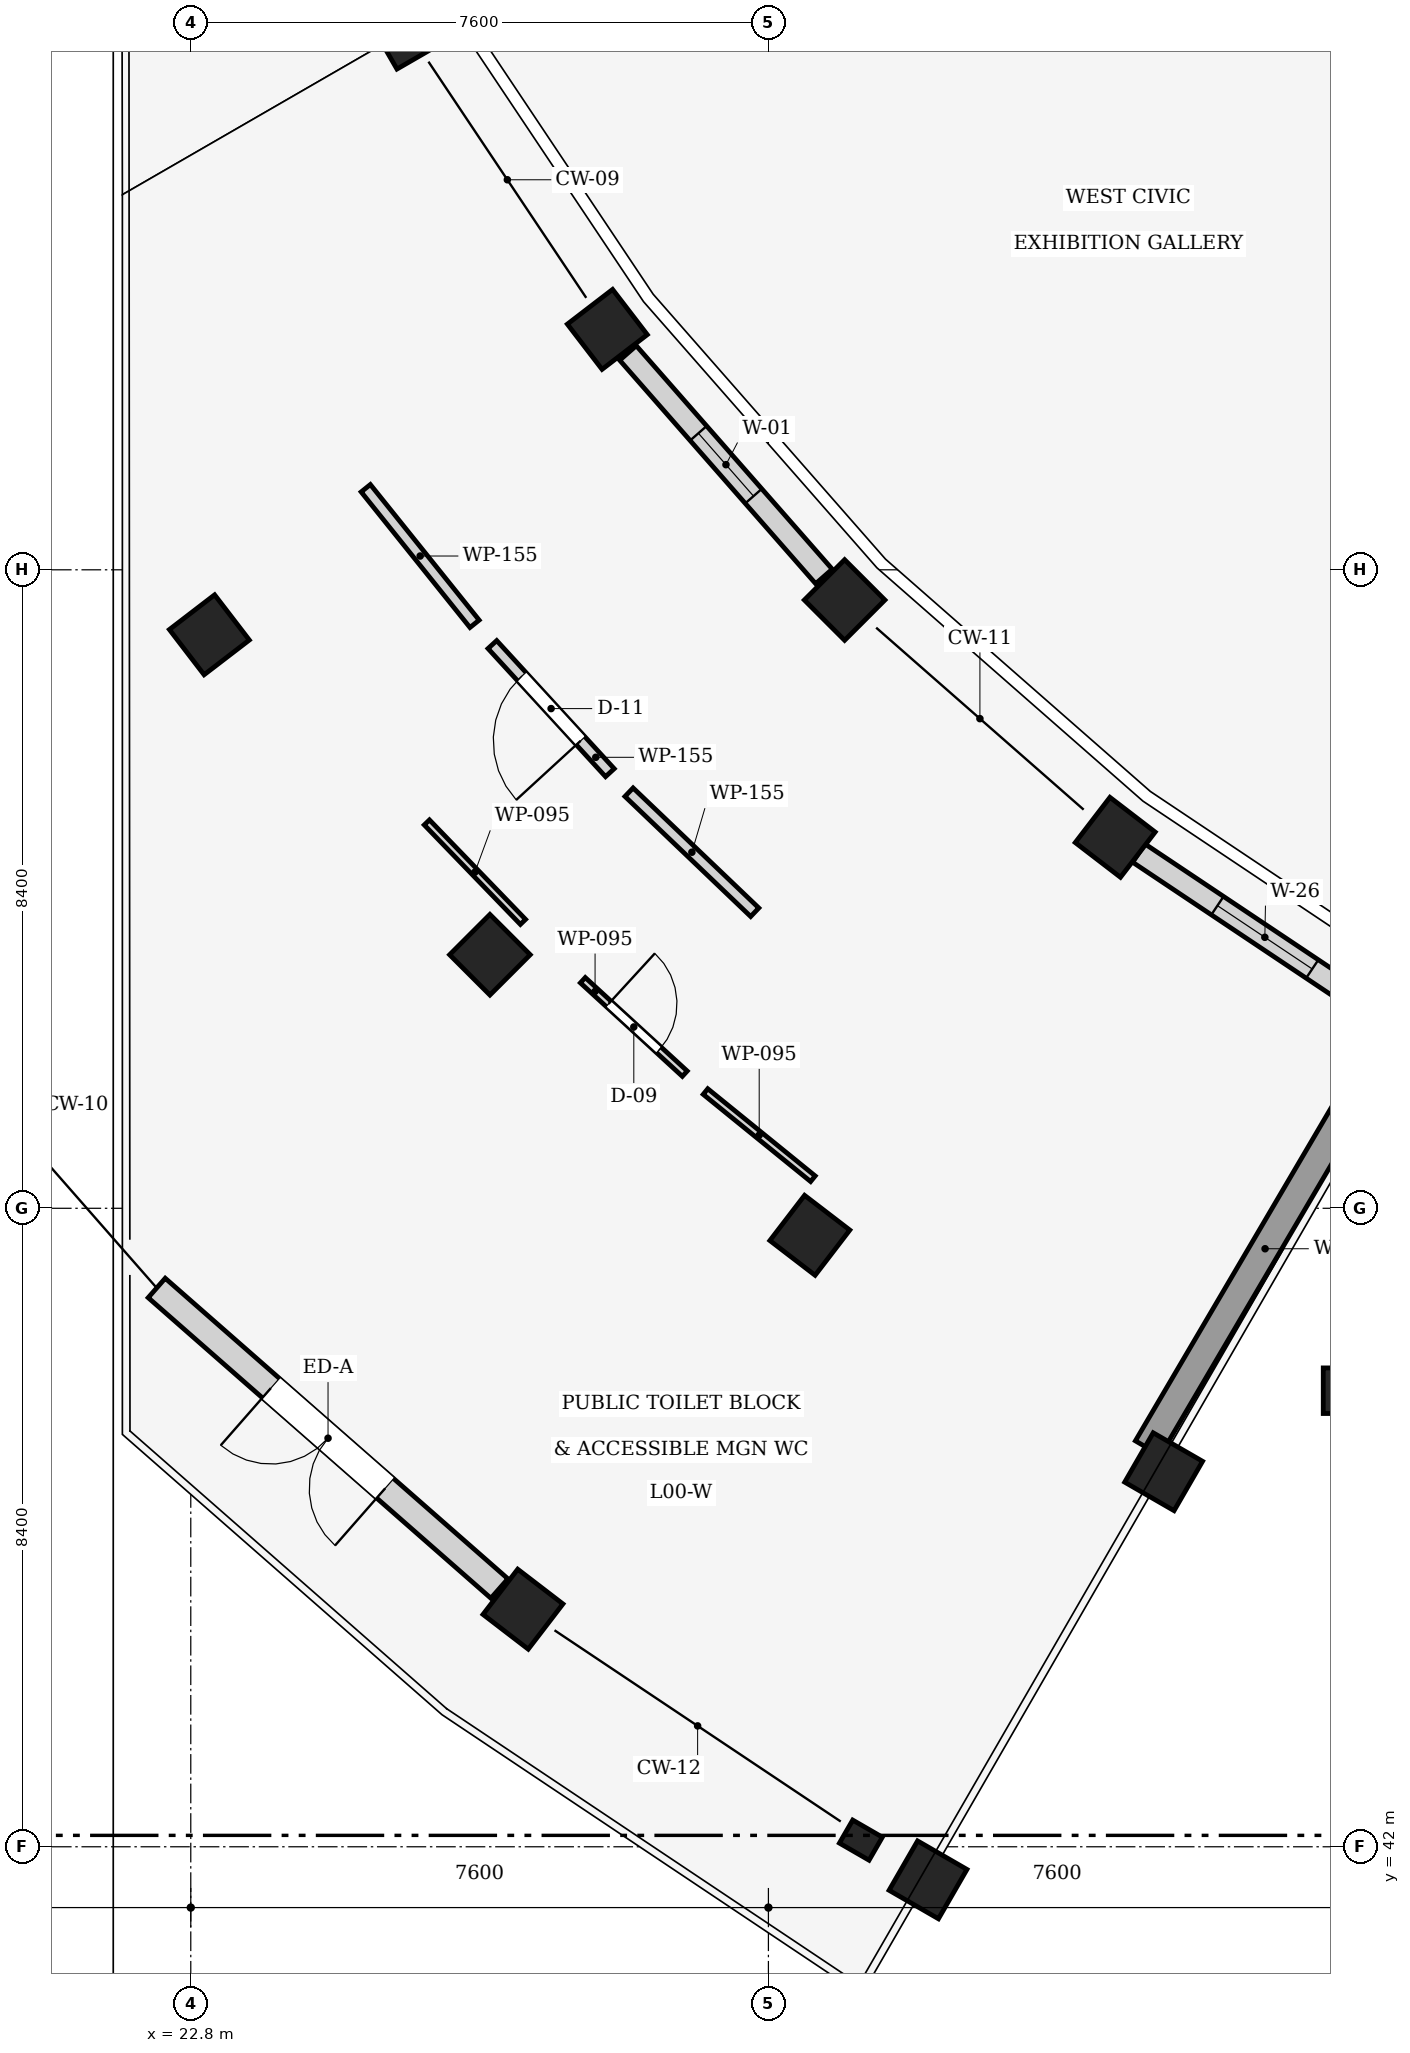
"""IFC4 building model, lengths in metres.
Left out: names, types, materials, properties, quantities, classifications, styles, units other than length and angle.
Written with IfcOpenShell. Run it as: python <this file> out.ifc"""

import sys

from ifc_helpers import new_model, si_unit, direction, frame, frame_2d, origin, origin_2d, place, context, subcontext, project, spatial, rectangle, circle, extrude, element, fill, save


model = new_model("IFC4")
c1 = context("Model", 3, precision=1e-05, world=origin(), true_north=direction((0.0, 1.0)))
c2 = subcontext(c1, "Body", "Model", "MODEL_VIEW")
j1 = project(units=[si_unit("LENGTHUNIT", "METRE"), si_unit("PLANEANGLEUNIT", "RADIAN")], contexts=[c1])
p1 = place(None, origin())
s1 = spatial("IfcSite", under=j1, at=p1, CompositionType="ELEMENT")
p2 = place(p1, origin())
s2 = spatial("IfcBuilding", under=s1, at=p2, CompositionType="ELEMENT")
p3 = place(p2, origin())
s3 = spatial("IfcBuildingStorey", under=s2, at=p3, CompositionType="ELEMENT", Elevation=0.0)
for number, where, z_axis, x_axis in (
    (1, (25.65, 65.9, 0.0), (0.0, 0.0, 1.0), (-0.866, -0.5, 0.0)),
    (2, (28.281, 61.963, 0.0), (0.0, 0.0, 1.0), (-0.793, -0.609, 0.0)),
    (3, (23.044, 57.945, 0.0), (0.0, 0.0, 1.0), (-0.793, -0.609, 0.0)),
    (4, (31.403, 58.403, 0.0), (0.0, 0.0, 1.0), (-0.707, -0.707, 0.0)),
    (5, (26.736, 53.736, 0.0), (0.0, 0.0, 1.0), (-0.707, -0.707, 0.0)),
    (6, (34.963, 55.281, 0.0), (0.0, 0.0, 1.0), (-0.609, -0.793, 0.0)),
    (7, (30.945, 50.044, 0.0), (0.0, 0.0, 1.0), (-0.609, -0.793, 0.0)),
    (8, (27.171, 45.126, 0.0), (0.0, 0.0, 1.0), (-0.609, -0.793, 0.0)),
    (9, (35.6, 46.934, 0.0), (0.0, 0.0, 1.0), (-0.5, -0.866, 0.0)),
    (10, (32.5, 41.565, 0.0), (0.0, 0.0, 1.0), (-0.5, -0.866, 0.0)),
):
    element("IfcColumn", number, at=place(p3, frame(where, z_axis=z_axis, x_axis=x_axis)), inside=s3, PredefinedType="COLUMN", context=c2, shape_type="SweptSolid", body=[
        extrude(circle(Radius=0.375, at=origin_2d()), origin(), (0.0, 0.0, 1.0), 5.1),
    ])
p4 = place(p3, frame((31.617, 42.087, 0.0), z_axis=(0.0, 0.0, 1.0), x_axis=(-0.5, -0.866025403784, 0.0)))
e11 = element("IfcColumn", 11, at=p4, inside=s3, PredefinedType="PILASTER", context=c2, shape_type="SweptSolid", body=[
    extrude(rectangle(XDim=0.35, YDim=0.45, at=origin_2d()), origin(), (0.0, 0.0, 1.0), 5.1),
])
p5 = place(p3, frame((38.0, 48.0, 0.0), z_axis=(0.0, 0.0, 1.0), x_axis=(1.0, 0.0, 0.0)))
e12 = element("IfcColumn", 12, at=p5, inside=s3, PredefinedType="COLUMN", context=c2, shape_type="SweptSolid", body=[
    extrude(rectangle(XDim=0.6, YDim=0.6, at=origin_2d()), origin(), (0.0, 0.0, 1.0), 5.1),
])
p6 = place(p3, frame((28.552, 61.653, 0.0), z_axis=(0.0, 0.0, 1.0), x_axis=(0.659330727041, -0.751853039083, 0.0)))
e13 = element("IfcWall", 13, at=p6, inside=s3, PredefinedType="STANDARD", context=c2, shape_type="SweptSolid", body=[
    extrude(rectangle(XDim=3.911, YDim=0.29, at=frame_2d((1.955, 0.0))), origin(), (0.0, 0.0, 1.0), 4.195),
])
p7 = place(p6, frame((1.405, 0.0, 0.85)))
e14 = element("IfcOpeningElement", 14, at=p7, cuts=e13, PredefinedType="OPENING", context=c2, shape_type="SweptSolid", body=[
    extrude(rectangle(XDim=1.1, YDim=1.35, at=frame_2d((0.55, 0.675))), frame((0.0, 0.155, 0.0), z_axis=(0.0, -1.0, 0.0), x_axis=(1.0, 0.0, 0.0)), (0.0, 0.0, 1.0), 0.31),
])
p8 = place(p3, frame((26.861, 45.398, 0.0), z_axis=(0.0, 0.0, 1.0), x_axis=(-0.751839834089, 0.659345784757, 0.0)))
e15 = element("IfcWall", 15, at=p8, inside=s3, PredefinedType="STANDARD", context=c2, shape_type="SweptSolid", body=[
    extrude(rectangle(XDim=5.997, YDim=0.34, at=frame_2d((2.999, 0.0))), origin(), (0.0, 0.0, 1.0), 4.75),
])
p9 = place(p8, frame((1.999, 0.0, 0.0)))
e16 = element("IfcOpeningElement", 16, at=p9, cuts=e15, PredefinedType="OPENING", context=c2, shape_type="SweptSolid", body=[
    extrude(rectangle(XDim=2.0, YDim=2.4, at=frame_2d((1.0, 1.2))), frame((0.0, 0.18, 0.0), z_axis=(0.0, -1.0, 0.0), x_axis=(1.0, 0.0, 0.0)), (0.0, 0.0, 1.0), 0.36),
])
p10 = place(p3, frame((35.273, 55.073, 0.0), z_axis=(0.0, 0.0, 1.0), x_axis=(0.831475585972, -0.555561292688, 0.0)))
e17 = element("IfcWall", 17, at=p10, inside=s3, PredefinedType="STANDARD", context=c2, shape_type="SweptSolid", body=[
    extrude(rectangle(XDim=3.99, YDim=0.29, at=frame_2d((1.995, 0.0))), origin(), (0.0, 0.0, 1.0), 4.195),
])
p11 = place(p10, frame((1.245, 0.0, 0.85)))
e18 = element("IfcOpeningElement", 18, at=p11, cuts=e17, PredefinedType="OPENING", context=c2, shape_type="SweptSolid", body=[
    extrude(rectangle(XDim=1.5, YDim=1.85, at=frame_2d((0.75, 0.925))), frame((0.0, 0.155, 0.0), z_axis=(0.0, -1.0, 0.0), x_axis=(1.0, 0.0, 0.0)), (0.0, 0.0, 1.0), 0.31),
])
p12 = place(p3, frame((38.477, 52.491, 0.0), z_axis=(0.0, 0.0, 1.0), x_axis=(-0.506800995465, -0.862063078316, 0.0)))
e19 = element("IfcWall", 19, at=p12, inside=s3, PredefinedType="SHEAR", context=c2, shape_type="SweptSolid", body=[
    extrude(rectangle(XDim=6.087, YDim=0.38, at=frame_2d((3.043, 0.0))), origin(), (0.0, 0.0, 1.0), 4.8),
])
p13 = place(p3, frame((27.958, 53.401, 0.0), z_axis=(0.0, 0.0, 1.0), x_axis=(0.737031619379, -0.675858263274, 0.0)))
e20 = element("IfcWall", 20, at=p13, inside=s3, PredefinedType="PARTITIONING", context=c2, shape_type="SweptSolid", body=[
    extrude(rectangle(XDim=1.82, YDim=0.095, at=frame_2d((0.91, 0.0))), origin(), (0.0, 0.0, 1.0), 4.73),
])
p14 = place(p13, frame((0.46, 0.0, 0.0)))
e21 = element("IfcOpeningElement", 21, at=p14, cuts=e20, PredefinedType="OPENING", context=c2, shape_type="SweptSolid", body=[
    extrude(rectangle(XDim=0.9, YDim=2.22, at=frame_2d((0.45, 1.11))), frame((0.0, 0.057, 0.0), z_axis=(0.0, -1.0, 0.0), x_axis=(1.0, 0.0, 0.0)), (0.0, 0.0, 1.0), 0.115),
])
p15 = place(p3, frame((29.572, 51.936, 0.0), z_axis=(0.0, 0.0, 1.0), x_axis=(0.776544649639, -0.630062224798, 0.0)))
e22 = element("IfcWall", 22, at=p15, inside=s3, PredefinedType="PARTITIONING", context=c2, shape_type="SweptSolid", body=[
    extrude(rectangle(XDim=1.82, YDim=0.095, at=frame_2d((0.91, 0.0))), origin(), (0.0, 0.0, 1.0), 4.73),
])
p16 = place(p3, frame((25.906, 55.477, 0.0), z_axis=(0.0, 0.0, 1.0), x_axis=(0.694862587072, -0.719142534612, 0.0)))
e23 = element("IfcWall", 23, at=p16, inside=s3, PredefinedType="PARTITIONING", context=c2, shape_type="SweptSolid", body=[
    extrude(rectangle(XDim=1.82, YDim=0.095, at=frame_2d((0.91, 0.0))), origin(), (0.0, 0.0, 1.0), 4.045),
])
p17 = place(p3, frame((28.314, 56.131, 0.0), z_axis=(0.0, 0.0, 1.0), x_axis=(-0.676029102078, 0.736874923677, 0.0)))
e24 = element("IfcWall", 24, at=p17, inside=s3, PredefinedType="PARTITIONING", context=c2, shape_type="SweptSolid", body=[
    extrude(rectangle(XDim=2.287, YDim=0.155, at=frame_2d((1.144, 0.0))), origin(), (0.0, 0.0, 1.0), 4.73),
])
p18 = place(p17, frame((0.569, 0.0, 0.0)))
e25 = element("IfcOpeningElement", 25, at=p18, cuts=e24, PredefinedType="OPENING", context=c2, shape_type="SweptSolid", body=[
    extrude(rectangle(XDim=1.15, YDim=2.22, at=frame_2d((0.575, 1.11))), frame((0.0, 0.087, 0.0), z_axis=(0.0, -1.0, 0.0), x_axis=(1.0, 0.0, 0.0)), (0.0, 0.0, 1.0), 0.175),
])
p19 = place(p3, frame((30.22, 54.295, 0.0), z_axis=(0.0, 0.0, 1.0), x_axis=(-0.723251321931, 0.690584915361, 0.0)))
e26 = element("IfcWall", 26, at=p19, inside=s3, PredefinedType="PARTITIONING", context=c2, shape_type="SweptSolid", body=[
    extrude(rectangle(XDim=2.287, YDim=0.155, at=frame_2d((1.144, 0.0))), origin(), (0.0, 0.0, 1.0), 4.045),
])
p20 = place(p3, frame((26.534, 58.089, 0.0), z_axis=(0.0, 0.0, 1.0), x_axis=(-0.625826894519, 0.779961985033, 0.0)))
e27 = element("IfcWall", 27, at=p20, inside=s3, PredefinedType="PARTITIONING", context=c2, shape_type="SweptSolid", body=[
    extrude(rectangle(XDim=2.287, YDim=0.155, at=frame_2d((1.144, 0.0))), origin(), (0.0, 0.0, 1.0), 4.045),
])
p21 = place(p7, origin())
e28 = element("IfcWindow", 28, at=p21, inside=s3, PartitioningType="SINGLE_PANEL", PredefinedType="WINDOW", context=c2, shape_type="SweptSolid", body=[
    extrude(rectangle(XDim=1.1, YDim=1.35, at=frame_2d((0.55, 0.675))), frame((0.0, 0.03, 0.0), z_axis=(0.0, -1.0, 0.0), x_axis=(1.0, 0.0, 0.0)), (0.0, 0.0, 1.0), 0.06),
])
fill(e14, e28)
p22 = place(p9, origin())
e29 = element("IfcDoor", 29, at=p22, inside=s3, OperationType="DOUBLE_DOOR_SINGLE_SWING", PredefinedType="DOOR", context=c2, shape_type="SweptSolid", body=[
    extrude(rectangle(XDim=2.0, YDim=2.4, at=frame_2d((1.0, 1.2))), frame((0.0, 0.025, 0.0), z_axis=(0.0, -1.0, 0.0), x_axis=(1.0, 0.0, 0.0)), (0.0, 0.0, 1.0), 0.05),
])
fill(e16, e29)
p23 = place(p11, origin())
e30 = element("IfcWindow", 30, at=p23, inside=s3, PartitioningType="SINGLE_PANEL", PredefinedType="WINDOW", context=c2, shape_type="SweptSolid", body=[
    extrude(rectangle(XDim=1.5, YDim=1.85, at=frame_2d((0.75, 0.925))), frame((0.0, 0.03, 0.0), z_axis=(0.0, -1.0, 0.0), x_axis=(1.0, 0.0, 0.0)), (0.0, 0.0, 1.0), 0.06),
])
fill(e18, e30)
p24 = place(p14, origin())
e31 = element("IfcDoor", 31, at=p24, inside=s3, OperationType="SINGLE_SWING_LEFT", PredefinedType="DOOR", context=c2, shape_type="SweptSolid", body=[
    extrude(rectangle(XDim=0.9, YDim=2.22, at=frame_2d((0.45, 1.11))), frame((0.0, 0.025, 0.0), z_axis=(0.0, -1.0, 0.0), x_axis=(1.0, 0.0, 0.0)), (0.0, 0.0, 1.0), 0.05),
])
fill(e21, e31)
p25 = place(p18, origin())
e32 = element("IfcDoor", 32, at=p25, inside=s3, OperationType="SINGLE_SWING_LEFT", PredefinedType="DOOR", context=c2, shape_type="SweptSolid", body=[
    extrude(rectangle(XDim=1.15, YDim=2.22, at=frame_2d((0.575, 1.11))), frame((0.0, 0.025, 0.0), z_axis=(0.0, -1.0, 0.0), x_axis=(1.0, 0.0, 0.0)), (0.0, 0.0, 1.0), 0.05),
])
fill(e25, e32)
save(model, sys.argv[1])
